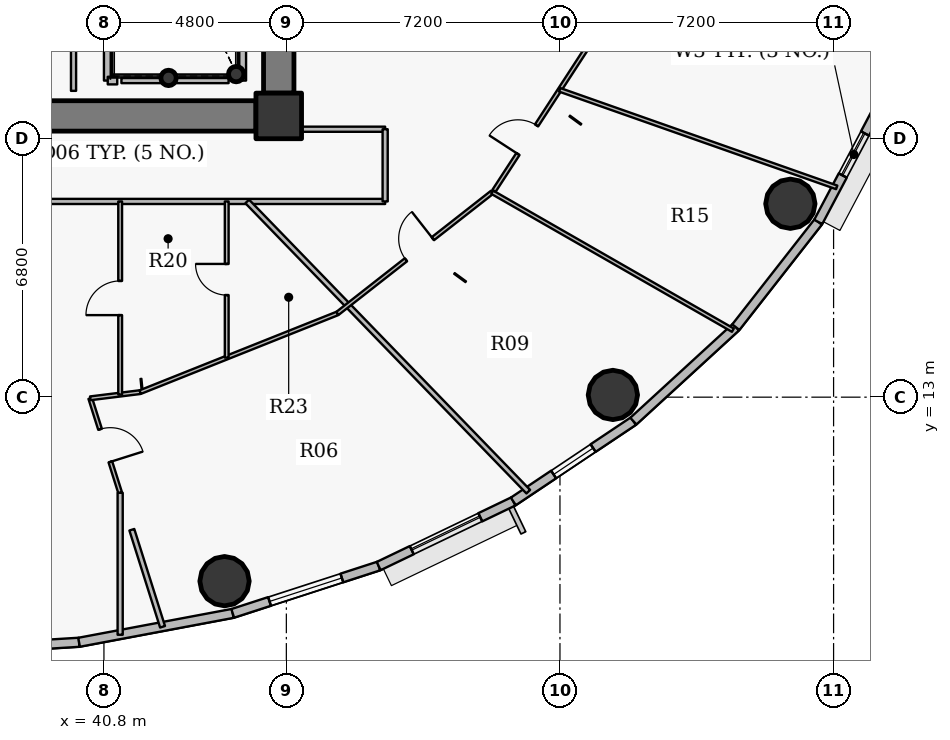
"""IFC4 building model, lengths in metres.
Left out: names, types, materials, properties, quantities, classifications, styles, units other than length and angle.
Written with IfcOpenShell. Run it as: python <this file> out.ifc"""

import sys

from ifc_helpers import new_model, si_unit, direction, frame, frame_2d, origin, origin_2d, place, context, subcontext, project, spatial, rectangle, hollow_circle, extrude, source, transform, mapped, element, fill, save


model = new_model("IFC4")
c1 = context("Model", 3, precision=1e-05, world=origin(), true_north=direction((0.0, 1.0)))
c2 = subcontext(c1, "Body", "Model", "MODEL_VIEW")
j1 = project(units=[si_unit("LENGTHUNIT", "METRE"), si_unit("PLANEANGLEUNIT", "RADIAN")], contexts=[c1])
p1 = place(None, origin())
s1 = spatial("IfcSite", under=j1, at=p1, CompositionType="ELEMENT")
p2 = place(p1, origin())
s2 = spatial("IfcBuilding", under=s1, at=p2, CompositionType="ELEMENT")
p3 = place(p2, frame((0.0, 0.0, 193.65)))
s3 = spatial("IfcBuildingStorey", under=s2, at=p3, CompositionType="ELEMENT", Elevation=193.65)
p4 = place(p3, frame((45.4, 20.4, 0.0), z_axis=(0.0, 0.0, 1.0), x_axis=(1.0, 0.0, 0.0)))
e1 = element("IfcColumn", 1, at=p4, inside=s3, PredefinedType="COLUMN", context=c2, shape_type="SweptSolid", body=[
    extrude(rectangle(XDim=1.2, YDim=1.2, at=origin_2d()), origin(), (0.0, 0.0, 1.0), 3.75),
])
for number, where, z_axis, x_axis in (
    (2, (44.28, 21.5, 0.0), (0.0, 0.0, 1.0), (1.0, 0.0, 0.0)),
    (3, (42.5, 21.4, 0.0), (0.0, 0.0, 1.0), (1.0, 0.0, 0.0)),
):
    element("IfcColumn", number, at=place(p3, frame(where, z_axis=z_axis, x_axis=x_axis)), inside=s3, PredefinedType="COLUMN", context=c2, shape_type="SweptSolid", body=[
        extrude(hollow_circle(Radius=0.203, WallThickness=0.016, at=origin_2d()), origin(), (0.0, 0.0, 1.0), 3.75),
    ])
p5 = place(p3, frame((45.4, 33.0, 0.0), z_axis=(0.0, 0.0, 1.0), x_axis=(0.0, -1.0, 0.0)))
e4 = element("IfcWall", 4, at=p5, inside=s3, PredefinedType="SHEAR", context=c2, shape_type="SweptSolid", body=[
    extrude(rectangle(XDim=12.0, YDim=0.8, at=frame_2d((6.0, 0.0))), origin(), (0.0, 0.0, 1.0), 2.95),
])
p6 = place(p3, frame((44.8, 20.4, 0.0), z_axis=(0.0, 0.0, 1.0), x_axis=(-1.0, 0.0, 0.0)))
e5 = element("IfcWall", 5, at=p6, inside=s3, PredefinedType="SHEAR", context=c2, shape_type="SweptSolid", body=[
    extrude(rectangle(XDim=17.6, YDim=0.8, at=frame_2d((8.8, 0.0))), origin(), (0.0, 0.0, 1.0), 2.95),
])
p7 = place(p6, frame((9.55, 0.0, 0.0)))
e6 = element("IfcOpeningElement", 6, at=p7, cuts=e5, PredefinedType="OPENING", context=c2, shape_type="SweptSolid", body=[
    extrude(rectangle(XDim=1.15, YDim=2.15, at=origin_2d()), frame((0.575, 0.41, 1.075), z_axis=(0.0, -1.0, 0.0), x_axis=(1.0, 0.0, 0.0)), (0.0, 0.0, 1.0), 0.82),
])
for number, where, z_axis, x_axis in (
    (7, (43.973, 8.159, 0.0), (0.0, 0.0, 1.0), (1.0, 0.0, 0.0)),
    (8, (54.192, 13.058, 0.0), (0.0, 0.0, 1.0), (1.0, 0.0, 0.0)),
    (9, (58.863, 18.089, 0.0), (0.0, 0.0, 1.0), (1.0, 0.0, 0.0)),
):
    element("IfcColumn", number, at=place(p3, frame(where, z_axis=z_axis, x_axis=x_axis)), inside=s3, PredefinedType="COLUMN", context=c2, shape_type="SweptSolid", body=[
        extrude(hollow_circle(Radius=0.65, WallThickness=0.04, at=origin_2d()), origin(), (0.0, 0.0, 1.0), 3.75),
    ])
p8 = place(p3, frame((40.146, 6.551, 0.0), z_axis=(0.0, 0.0, 1.0), x_axis=(-0.998104600619, -0.061540281305, 0.0)))
e10 = element("IfcWall", 10, at=p8, inside=s3, PredefinedType="SOLIDWALL", context=c2, shape_type="SweptSolid", body=[
    extrude(rectangle(XDim=4.154, YDim=0.24, at=frame_2d((2.077, 0.0))), origin(), (0.0, 0.0, 1.0), 3.5),
])
p9 = place(p8, frame((1.077, 0.0, 0.9)))
e11 = element("IfcOpeningElement", 11, at=p9, cuts=e10, PredefinedType="OPENING", context=c2, shape_type="SweptSolid", body=[
    extrude(rectangle(XDim=2.0, YDim=1.75, at=origin_2d()), frame((1.0, 0.13, 0.875), z_axis=(0.0, -1.0, 0.0), x_axis=(1.0, 0.0, 0.0)), (0.0, 0.0, 1.0), 0.26),
])
p10 = place(p3, frame((44.189, 7.311, 0.0), z_axis=(0.0, 0.0, 1.0), x_axis=(-0.982788108205, -0.184736391573, 0.0)))
e12 = element("IfcWall", 12, at=p10, inside=s3, PredefinedType="SOLIDWALL", context=c2, shape_type="SweptSolid", body=[
    extrude(rectangle(XDim=4.114, YDim=0.24, at=frame_2d((2.057, 0.0))), origin(), (0.0, 0.0, 1.0), 3.5),
])
p11 = place(p3, frame((48.03, 8.556, 0.0), z_axis=(0.0, 0.0, 1.0), x_axis=(-0.951209870236, -0.30854462038, 0.0)))
e13 = element("IfcWall", 13, at=p11, inside=s3, PredefinedType="SOLIDWALL", context=c2, shape_type="SweptSolid", body=[
    extrude(rectangle(XDim=4.038, YDim=0.24, at=frame_2d((2.019, 0.0))), origin(), (0.0, 0.0, 1.0), 3.5),
])
p12 = place(p11, frame((1.019, 0.0, 0.9)))
e14 = element("IfcOpeningElement", 14, at=p12, cuts=e13, PredefinedType="OPENING", context=c2, shape_type="SweptSolid", body=[
    extrude(rectangle(XDim=2.0, YDim=1.75, at=origin_2d()), frame((1.0, 0.13, 0.875), z_axis=(0.0, -1.0, 0.0), x_axis=(1.0, 0.0, 0.0)), (0.0, 0.0, 1.0), 0.26),
])
p13 = place(p3, frame((51.573, 10.257, 0.0), z_axis=(0.0, 0.0, 1.0), x_axis=(-0.901564733809, -0.432644231155, 0.0)))
e15 = element("IfcWall", 15, at=p13, inside=s3, PredefinedType="SOLIDWALL", context=c2, shape_type="SweptSolid", body=[
    extrude(rectangle(XDim=3.93, YDim=0.24, at=frame_2d((1.965, 0.0))), origin(), (0.0, 0.0, 1.0), 3.5),
])
p14 = place(p13, frame((0.965, 0.0, 0.9)))
e16 = element("IfcOpeningElement", 16, at=p14, cuts=e15, PredefinedType="OPENING", context=c2, shape_type="SweptSolid", body=[
    extrude(rectangle(XDim=2.0, YDim=1.75, at=origin_2d()), frame((1.0, 0.13, 0.875), z_axis=(0.0, -1.0, 0.0), x_axis=(1.0, 0.0, 0.0)), (0.0, 0.0, 1.0), 0.26),
])
p15 = place(p3, frame((54.732, 12.369, 0.0), z_axis=(0.0, 0.0, 1.0), x_axis=(-0.831228998277, -0.555930168657, 0.0)))
e17 = element("IfcWall", 17, at=p15, inside=s3, PredefinedType="SOLIDWALL", context=c2, shape_type="SweptSolid", body=[
    extrude(rectangle(XDim=3.8, YDim=0.24, at=frame_2d((1.9, 0.0))), origin(), (0.0, 0.0, 1.0), 3.5),
])
p16 = place(p15, frame((1.275, 0.0, 0.9)))
e18 = element("IfcOpeningElement", 18, at=p16, cuts=e17, PredefinedType="OPENING", context=c2, shape_type="SweptSolid", body=[
    extrude(rectangle(XDim=1.25, YDim=1.65, at=origin_2d()), frame((0.625, 0.13, 0.825), z_axis=(0.0, -1.0, 0.0), x_axis=(1.0, 0.0, 0.0)), (0.0, 0.0, 1.0), 0.26),
])
p17 = place(p3, frame((57.428, 14.842, 0.0), z_axis=(0.0, 0.0, 1.0), x_axis=(-0.737076565834, -0.675809245349, 0.0)))
e19 = element("IfcWall", 19, at=p17, inside=s3, PredefinedType="SOLIDWALL", context=c2, shape_type="SweptSolid", body=[
    extrude(rectangle(XDim=3.658, YDim=0.24, at=frame_2d((1.829, 0.0))), origin(), (0.0, 0.0, 1.0), 3.5),
])
p18 = place(p3, frame((59.596, 17.612, 0.0), z_axis=(0.0, 0.0, 1.0), x_axis=(-0.616287674549, -0.787521112224, 0.0)))
e20 = element("IfcWall", 20, at=p18, inside=s3, PredefinedType="SOLIDWALL", context=c2, shape_type="SweptSolid", body=[
    extrude(rectangle(XDim=3.517, YDim=0.24, at=frame_2d((1.759, 0.0))), origin(), (0.0, 0.0, 1.0), 3.5),
])
p19 = place(p3, frame((61.183, 20.611, 0.0), z_axis=(0.0, 0.0, 1.0), x_axis=(-0.467586874938, -0.88394712194, 0.0)))
e21 = element("IfcWall", 21, at=p19, inside=s3, PredefinedType="SOLIDWALL", context=c2, shape_type="SweptSolid", body=[
    extrude(rectangle(XDim=3.393, YDim=0.24, at=frame_2d((1.697, 0.0))), origin(), (0.0, 0.0, 1.0), 3.5),
])
p20 = place(p19, frame((0.762, 0.0, 0.9)))
e22 = element("IfcOpeningElement", 22, at=p20, cuts=e21, PredefinedType="OPENING", context=c2, shape_type="SweptSolid", body=[
    extrude(rectangle(XDim=1.25, YDim=1.65, at=origin_2d()), frame((0.625, 0.13, 0.825), z_axis=(0.0, -1.0, 0.0), x_axis=(1.0, 0.0, 0.0)), (0.0, 0.0, 1.0), 0.26),
])
p21 = place(p3, frame((34.605, 18.15, 0.0), z_axis=(0.0, 0.0, 1.0), x_axis=(1.0, 0.0, 0.0)))
e23 = element("IfcWall", 23, at=p21, inside=s3, PredefinedType="PARTITIONING", context=c2, shape_type="SweptSolid", body=[
    extrude(rectangle(XDim=13.595, YDim=0.135, at=frame_2d((6.798, 0.0))), origin(), (0.0, 0.0, 1.0), 2.935),
])
p22 = place(p3, frame((40.44, 12.97, 0.0), z_axis=(0.0, 0.0, 1.0), x_axis=(0.301727202982, -0.953394301945, 0.0)))
e24 = element("IfcWall", 24, at=p22, inside=s3, PredefinedType="PARTITIONING", context=c2, shape_type="SweptSolid", body=[
    extrude(rectangle(XDim=2.608, YDim=0.1, at=frame_2d((1.304, 0.0))), origin(), (0.0, 0.0, 1.0), 3.5),
])
p23 = place(p22, frame((0.854, 0.0, 0.0)))
e25 = element("IfcOpeningElement", 25, at=p23, cuts=e24, PredefinedType="OPENING", context=c2, shape_type="SweptSolid", body=[
    extrude(rectangle(XDim=0.9, YDim=2.1, at=origin_2d()), frame((0.45, 0.06, 1.05), z_axis=(0.0, -1.0, 0.0), x_axis=(1.0, 0.0, 0.0)), (0.0, 0.0, 1.0), 0.12),
])
p24 = place(p3, frame((40.44, 12.97, 0.0), z_axis=(0.0, 0.0, 1.0), x_axis=(0.99240503164, 0.123013223584, 0.0)))
e26 = element("IfcWall", 26, at=p24, inside=s3, PredefinedType="PARTITIONING", context=c2, shape_type="SweptSolid", body=[
    extrude(rectangle(XDim=1.324, YDim=0.1, at=frame_2d((0.662, 0.0))), origin(), (0.0, 0.0, 1.0), 2.935),
])
p25 = place(p3, frame((40.9, 21.33, 0.0), z_axis=(0.0, 0.0, 1.0), x_axis=(0.0, 1.0, 0.0)))
e27 = element("IfcWall", 27, at=p25, inside=s3, PredefinedType="PARTITIONING", context=c2, shape_type="SweptSolid", body=[
    extrude(rectangle(XDim=5.91, YDim=0.2, at=frame_2d((2.955, 0.0))), origin(), (0.0, 0.0, 1.0), 3.035),
])
p26 = place(p3, frame((40.9, 21.33, 0.0), z_axis=(0.0, 0.0, 1.0), x_axis=(1.0, 0.0, 0.0)))
e28 = element("IfcWall", 28, at=p26, inside=s3, PredefinedType="PARTITIONING", context=c2, shape_type="SweptSolid", body=[
    extrude(rectangle(XDim=0.25, YDim=0.2, at=frame_2d((0.125, 0.0))), origin(), (0.0, 0.0, 1.0), 3.035),
])
p27 = place(p3, frame((41.227, 13.067, 0.0), z_axis=(0.0, 0.0, 1.0), x_axis=(0.0, 1.0, 0.0)))
e29 = element("IfcWall", 29, at=p27, inside=s3, PredefinedType="PARTITIONING", context=c2, shape_type="SweptSolid", body=[
    extrude(rectangle(XDim=5.083, YDim=0.1, at=frame_2d((2.541, 0.0))), origin(), (0.0, 0.0, 1.0), 2.935),
])
p28 = place(p27, frame((2.091, 0.0, 0.0)))
e30 = element("IfcOpeningElement", 30, at=p28, cuts=e29, PredefinedType="OPENING", context=c2, shape_type="SweptSolid", body=[
    extrude(rectangle(XDim=0.9, YDim=2.1, at=origin_2d()), frame((0.45, 0.06, 1.05), z_axis=(0.0, -1.0, 0.0), x_axis=(1.0, 0.0, 0.0)), (0.0, 0.0, 1.0), 0.12),
])
p29 = place(p3, frame((41.754, 13.133, 0.0), z_axis=(0.0, 0.0, 1.0), x_axis=(0.928798710424, 0.370584613166, 0.0)))
e31 = element("IfcWall", 31, at=p29, inside=s3, PredefinedType="PARTITIONING", context=c2, shape_type="SweptSolid", body=[
    extrude(rectangle(XDim=5.589, YDim=0.1, at=frame_2d((2.794, 0.0))), origin(), (0.0, 0.0, 1.0), 2.935),
])
p30 = place(p3, frame((44.031, 14.041, 0.0), z_axis=(0.0, 0.0, 1.0), x_axis=(0.0, 1.0, 0.0)))
e32 = element("IfcWall", 32, at=p30, inside=s3, PredefinedType="PARTITIONING", context=c2, shape_type="SweptSolid", body=[
    extrude(rectangle(XDim=4.109, YDim=0.1, at=frame_2d((2.054, 0.0))), origin(), (0.0, 0.0, 1.0), 3.5),
])
p31 = place(p30, frame((1.644, 0.0, 0.0)))
e33 = element("IfcOpeningElement", 33, at=p31, cuts=e32, PredefinedType="OPENING", context=c2, shape_type="SweptSolid", body=[
    extrude(rectangle(XDim=0.82, YDim=2.1, at=origin_2d()), frame((0.41, 0.06, 1.05), z_axis=(0.0, -1.0, 0.0), x_axis=(1.0, 0.0, 0.0)), (0.0, 0.0, 1.0), 0.12),
])
p32 = place(p3, frame((44.44, 21.33, 0.0), z_axis=(0.0, 0.0, 1.0), x_axis=(0.0, 1.0, 0.0)))
e34 = element("IfcWall", 34, at=p32, inside=s3, PredefinedType="PARTITIONING", context=c2, shape_type="SweptSolid", body=[
    extrude(rectangle(XDim=8.52, YDim=0.2, at=frame_2d((4.26, 0.0))), origin(), (0.0, 0.0, 1.0), 3.5),
])
p33 = place(p3, frame((44.571, 18.15, 0.0), z_axis=(0.0, 0.0, 1.0), x_axis=(0.695670435579, -0.718361082647, 0.0)))
e35 = element("IfcWall", 35, at=p33, inside=s3, PredefinedType="PARTITIONING", context=c2, shape_type="SweptSolid", body=[
    extrude(rectangle(XDim=10.63, YDim=0.135, at=frame_2d((5.315, 0.0))), origin(), (0.0, 0.0, 1.0), 2.935),
])
p34 = place(p3, frame((45.8, 20.05, 0.0), z_axis=(0.0, 0.0, 1.0), x_axis=(1.0, 0.0, 0.0)))
e36 = element("IfcWall", 36, at=p34, inside=s3, PredefinedType="PARTITIONING", context=c2, shape_type="SweptSolid", body=[
    extrude(rectangle(XDim=2.4, YDim=0.135, at=frame_2d((1.2, 0.0))), origin(), (0.0, 0.0, 1.0), 3.5),
])
p35 = place(p3, frame((46.945, 15.204, 0.0), z_axis=(0.0, 0.0, 1.0), x_axis=(0.787319701233, 0.616544960282, 0.0)))
e37 = element("IfcWall", 37, at=p35, inside=s3, PredefinedType="PARTITIONING", context=c2, shape_type="SweptSolid", body=[
    extrude(rectangle(XDim=5.172, YDim=0.1, at=frame_2d((2.586, 0.0))), origin(), (0.0, 0.0, 1.0), 2.935),
])
p36 = place(p35, frame((2.289, 0.0, 0.0)))
e38 = element("IfcOpeningElement", 38, at=p36, cuts=e37, PredefinedType="OPENING", context=c2, shape_type="SweptSolid", body=[
    extrude(rectangle(XDim=0.9, YDim=2.1, at=origin_2d()), frame((0.45, 0.06, 1.05), z_axis=(0.0, -1.0, 0.0), x_axis=(1.0, 0.0, 0.0)), (0.0, 0.0, 1.0), 0.12),
])
p37 = place(p3, frame((48.2, 18.15, 0.0), z_axis=(0.0, 0.0, 1.0), x_axis=(0.0, 1.0, 0.0)))
e39 = element("IfcWall", 39, at=p37, inside=s3, PredefinedType="PARTITIONING", context=c2, shape_type="SweptSolid", body=[
    extrude(rectangle(XDim=1.9, YDim=0.135, at=frame_2d((0.95, 0.0))), origin(), (0.0, 0.0, 1.0), 3.5),
])
p38 = place(p3, frame((51.017, 18.393, 0.0), z_axis=(0.0, 0.0, 1.0), x_axis=(0.867591997953, -0.497276708773, 0.0)))
e40 = element("IfcWall", 40, at=p38, inside=s3, PredefinedType="PARTITIONING", context=c2, shape_type="SweptSolid", body=[
    extrude(rectangle(XDim=7.3, YDim=0.1, at=frame_2d((3.65, 0.0))), origin(), (0.0, 0.0, 1.0), 2.935),
])
p39 = place(p3, frame((51.064, 18.429, 0.0), z_axis=(0.0, 0.0, 1.0), x_axis=(0.545382906853, 0.838187022634, 0.0)))
e41 = element("IfcWall", 41, at=p39, inside=s3, PredefinedType="PARTITIONING", context=c2, shape_type="SweptSolid", body=[
    extrude(rectangle(XDim=4.849, YDim=0.1, at=frame_2d((2.425, 0.0))), origin(), (0.0, 0.0, 1.0), 2.935),
])
p40 = place(p39, frame((1.155, 0.0, 0.0)))
e42 = element("IfcOpeningElement", 42, at=p40, cuts=e41, PredefinedType="OPENING", context=c2, shape_type="SweptSolid", body=[
    extrude(rectangle(XDim=0.9, YDim=2.1, at=origin_2d()), frame((0.45, 0.06, 1.05), z_axis=(0.0, -1.0, 0.0), x_axis=(1.0, 0.0, 0.0)), (0.0, 0.0, 1.0), 0.12),
])
p41 = place(p3, frame((52.793, 21.087, 0.0), z_axis=(0.0, 0.0, 1.0), x_axis=(0.94322572083, -0.33215243423, 0.0)))
e43 = element("IfcWall", 43, at=p41, inside=s3, PredefinedType="PARTITIONING", context=c2, shape_type="SweptSolid", body=[
    extrude(rectangle(XDim=7.728, YDim=0.1, at=frame_2d((3.864, 0.0))), origin(), (0.0, 0.0, 1.0), 2.935),
])
p42 = place(p3, frame((44.08, 21.33, 0.0), z_axis=(0.0, 0.0, 1.0), x_axis=(-1.0, 0.0, 0.0)))
e44 = element("IfcWall", 44, at=p42, inside=s3, PredefinedType="PARTITIONING", context=c2, shape_type="SweptSolid", body=[
    extrude(rectangle(XDim=2.82, YDim=0.135, at=frame_2d((1.41, 0.0))), origin(), (0.0, 0.0, 1.0), 3.035),
])
p43 = place(p3, frame((40.0, 23.7, 0.0), z_axis=(0.0, 0.0, 1.0), x_axis=(0.0, -1.0, 0.0)))
e45 = element("IfcWall", 45, at=p43, inside=s3, PredefinedType="PARTITIONING", context=c2, shape_type="SweptSolid", body=[
    extrude(rectangle(XDim=2.64, YDim=0.135, at=frame_2d((1.32, 0.0))), origin(), (0.0, 0.0, 1.0), 3.035),
])
p44 = place(p3, frame((44.81, 20.0, 0.0), z_axis=(0.0, 0.0, 1.0), x_axis=(1.0, 0.0, 0.0)))
e46 = element("IfcWall", 46, at=p44, inside=s3, PredefinedType="PARTITIONING", context=c2, shape_type="SweptSolid", body=[
    extrude(rectangle(XDim=0.98, YDim=0.135, at=frame_2d((0.49, 0.0))), origin(), (0.0, 0.0, 1.0), 2.935),
])
p45 = place(p3, frame((41.227, 10.483, 0.0), z_axis=(0.0, 0.0, 1.0), x_axis=(0.0, -1.0, 0.0)))
e47 = element("IfcWall", 47, at=p45, inside=s3, PredefinedType="PARTITIONING", context=c2, shape_type="SweptSolid", body=[
    extrude(rectangle(XDim=3.735, YDim=0.135, at=frame_2d((1.867, 0.0))), origin(), (0.0, 0.0, 1.0), 2.935),
])
p46 = place(p3, frame((42.343, 6.958, 0.0), z_axis=(0.0, 0.0, 1.0), x_axis=(-0.30175084808, 0.953386818496, 0.0)))
e48 = element("IfcWall", 48, at=p46, inside=s3, PredefinedType="PARTITIONING", context=c2, shape_type="SweptSolid", body=[
    extrude(rectangle(XDim=2.678, YDim=0.135, at=frame_2d((1.339, 0.0))), origin(), (0.0, 0.0, 1.0), 2.935),
])
p47 = place(p3, frame((45.8, 20.377, 0.0), z_axis=(0.0, 0.0, 1.0), x_axis=(0.0, 1.0, 0.0)))
e49 = element("IfcWall", 49, at=p47, inside=s3, PredefinedType="PARTITIONING", context=c2, shape_type="SweptSolid", body=[
    extrude(rectangle(XDim=0.613, YDim=0.135, at=frame_2d((0.306, 0.0))), origin(), (0.0, 0.0, 1.0), 3.5),
])
m1 = source(origin(), c2, "Body", "SweptSolid", [
    extrude(rectangle(XDim=2.0, YDim=1.75, at=origin_2d()), frame((1.0, 0.03, 0.875), z_axis=(0.0, -1.0, 0.0), x_axis=(1.0, 0.0, 0.0)), (0.0, 0.0, 1.0), 0.06),
])
p48 = place(p12, origin())
e50 = element("IfcWindow", 50, at=p48, inside=s3, PartitioningType="DOUBLE_PANEL_VERTICAL", PredefinedType="WINDOW", context=c2, shape_type="MappedRepresentation", body=[
    mapped(m1, transform((0.0, 0.0, 0.0), x_axis=(1.0, 0.0, 0.0), y_axis=(0.0, 1.0, 0.0), z_axis=(0.0, 0.0, 1.0), scale=1.0)),
])
fill(e14, e50)
p49 = place(p14, origin())
e51 = element("IfcWindow", 51, at=p49, inside=s3, PartitioningType="DOUBLE_PANEL_VERTICAL", PredefinedType="WINDOW", context=c2, shape_type="MappedRepresentation", body=[
    mapped(m1, transform((0.0, 0.0, 0.0), x_axis=(1.0, 0.0, 0.0), y_axis=(0.0, 1.0, 0.0), z_axis=(0.0, 0.0, 1.0), scale=1.0)),
])
fill(e16, e51)
m2 = source(origin(), c2, "Body", "SweptSolid", [
    extrude(rectangle(XDim=1.25, YDim=1.65, at=origin_2d()), frame((0.625, 0.03, 0.825), z_axis=(0.0, -1.0, 0.0), x_axis=(1.0, 0.0, 0.0)), (0.0, 0.0, 1.0), 0.06),
])
p50 = place(p20, origin())
e52 = element("IfcWindow", 52, at=p50, inside=s3, PartitioningType="SINGLE_PANEL", PredefinedType="WINDOW", context=c2, shape_type="MappedRepresentation", body=[
    mapped(m2, transform((0.0, 0.0, 0.0), x_axis=(1.0, 0.0, 0.0), y_axis=(0.0, 1.0, 0.0), z_axis=(0.0, 0.0, 1.0), scale=1.0)),
])
fill(e22, e52)
p51 = place(p16, origin())
e53 = element("IfcWindow", 53, at=p51, inside=s3, PartitioningType="SINGLE_PANEL", PredefinedType="WINDOW", context=c2, shape_type="MappedRepresentation", body=[
    mapped(m2, transform((0.0, 0.0, 0.0), x_axis=(1.0, 0.0, 0.0), y_axis=(0.0, 1.0, 0.0), z_axis=(0.0, 0.0, 1.0), scale=1.0)),
])
fill(e18, e53)
m3 = source(origin(), c2, "Body", "SweptSolid", [
    extrude(rectangle(XDim=0.9, YDim=2.1, at=origin_2d()), frame((0.45, 0.025, 1.05), z_axis=(0.0, -1.0, 0.0), x_axis=(1.0, 0.0, 0.0)), (0.0, 0.0, 1.0), 0.05),
])
p52 = place(p23, origin())
e54 = element("IfcDoor", 54, at=p52, inside=s3, OperationType="SINGLE_SWING_RIGHT", PredefinedType="DOOR", context=c2, shape_type="MappedRepresentation", body=[
    mapped(m3, transform((0.0, 0.0, 0.0), x_axis=(1.0, 0.0, 0.0), y_axis=(0.0, 1.0, 0.0), z_axis=(0.0, 0.0, 1.0), scale=1.0)),
])
fill(e25, e54)
p53 = place(p28, origin())
e55 = element("IfcDoor", 55, at=p53, inside=s3, OperationType="SINGLE_SWING_LEFT", PredefinedType="DOOR", context=c2, shape_type="MappedRepresentation", body=[
    mapped(m3, transform((0.0, 0.0, 0.0), x_axis=(1.0, 0.0, 0.0), y_axis=(0.0, 1.0, 0.0), z_axis=(0.0, 0.0, 1.0), scale=1.0)),
])
fill(e30, e55)
m4 = source(origin(), c2, "Body", "SweptSolid", [
    extrude(rectangle(XDim=0.82, YDim=2.1, at=origin_2d()), frame((0.41, 0.025, 1.05), z_axis=(0.0, -1.0, 0.0), x_axis=(1.0, 0.0, 0.0)), (0.0, 0.0, 1.0), 0.05),
])
p54 = place(p31, origin())
e56 = element("IfcDoor", 56, at=p54, inside=s3, OperationType="SINGLE_SWING_RIGHT", PredefinedType="DOOR", context=c2, shape_type="MappedRepresentation", body=[
    mapped(m4, transform((0.0, 0.0, 0.0), x_axis=(1.0, 0.0, 0.0), y_axis=(0.0, 1.0, 0.0), z_axis=(0.0, 0.0, 1.0), scale=1.0)),
])
fill(e33, e56)
p55 = place(p36, origin())
e57 = element("IfcDoor", 57, at=p55, inside=s3, OperationType="SINGLE_SWING_RIGHT", PredefinedType="DOOR", context=c2, shape_type="MappedRepresentation", body=[
    mapped(m3, transform((0.0, 0.0, 0.0), x_axis=(1.0, 0.0, 0.0), y_axis=(0.0, 1.0, 0.0), z_axis=(0.0, 0.0, 1.0), scale=1.0)),
])
fill(e38, e57)
p56 = place(p40, origin())
e58 = element("IfcDoor", 58, at=p56, inside=s3, OperationType="SINGLE_SWING_LEFT", PredefinedType="DOOR", context=c2, shape_type="MappedRepresentation", body=[
    mapped(m3, transform((0.0, 0.0, 0.0), x_axis=(1.0, 0.0, 0.0), y_axis=(0.0, 1.0, 0.0), z_axis=(0.0, 0.0, 1.0), scale=1.0)),
])
fill(e42, e58)
save(model, sys.argv[1])
